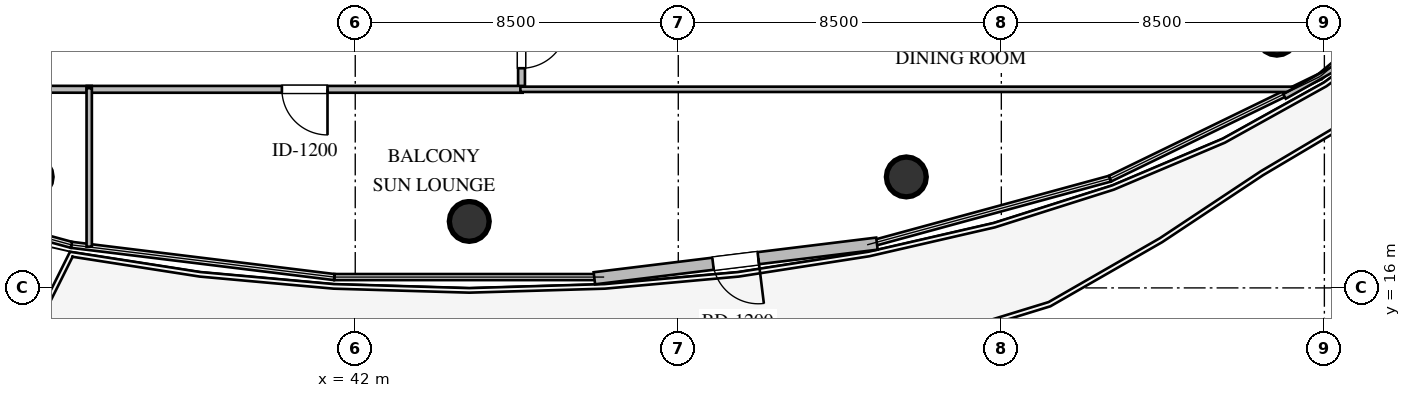
"""IFC4 building model, lengths in metres.
Left out: names, types, materials, properties, quantities, classifications, styles, units other than length and angle.
Written with IfcOpenShell. Run it as: python <this file> out.ifc"""

import sys

from ifc_helpers import new_model, si_unit, direction, frame, frame_2d, origin, origin_2d, place, context, subcontext, project, spatial, rectangle, circle, extrude, element, fill, save


model = new_model("IFC4")
c1 = context("Model", 3, precision=1e-05, world=origin(), true_north=direction((0.0, 1.0)))
c2 = subcontext(c1, "Body", "Model", "MODEL_VIEW")
j1 = project(units=[si_unit("LENGTHUNIT", "METRE"), si_unit("PLANEANGLEUNIT", "RADIAN")], contexts=[c1])
p1 = place(None, origin())
s1 = spatial("IfcSite", under=j1, at=p1, CompositionType="ELEMENT")
p2 = place(p1, origin())
s2 = spatial("IfcBuilding", under=s1, at=p2, CompositionType="ELEMENT")
p3 = place(p2, frame((0.0, 0.0, 213.6)))
s3 = spatial("IfcBuildingStorey", under=s2, at=p3, CompositionType="ELEMENT", Elevation=213.6)
for number, where, z_axis, x_axis in (
    (1, (45.0, 17.75, 0.0), (0.0, 0.0, 1.0), (1.0, 0.0, 0.0)),
    (2, (56.5, 18.92, 0.0), (0.0, 0.0, 1.0), (1.0, 0.0, 0.0)),
    (3, (66.25, 22.65, 0.0), (0.0, 0.0, 1.0), (1.0, 0.0, 0.0)),
):
    element("IfcColumn", number, at=place(p3, frame(where, z_axis=z_axis, x_axis=x_axis)), inside=s3, PredefinedType="COLUMN", context=c2, shape_type="SweptSolid", body=[
        extrude(circle(Radius=0.525, at=origin_2d()), origin(), (0.0, 0.0, 1.0), 3.6),
    ])
p4 = place(p3, frame((55.727, 17.165, 0.0), z_axis=(0.0, 0.0, 1.0), x_axis=(-0.992559081031, -0.121763995755, 0.0)))
e4 = element("IfcWall", 4, at=p4, inside=s3, PredefinedType="STANDARD", context=c2, shape_type="SweptSolid", body=[
    extrude(rectangle(XDim=7.491, YDim=0.32, at=frame_2d((3.745, 0.0))), origin(), (0.0, 0.0, 1.0), 3.36),
])
p5 = place(p4, frame((3.145, 0.0, 0.0)))
e5 = element("IfcOpeningElement", 5, at=p5, cuts=e4, PredefinedType="OPENING", context=c2, shape_type="SweptSolid", body=[
    extrude(rectangle(XDim=1.2, YDim=2.15, at=frame_2d((0.6, 1.075))), frame((0.0, 0.17, 0.0), z_axis=(0.0, -1.0, 0.0), x_axis=(1.0, 0.0, 0.0)), (0.0, 0.0, 1.0), 0.34),
])
p6 = place(p3, frame((46.375, 23.565, 0.0), z_axis=(0.0, 0.0, 1.0), x_axis=(0.0, -1.0, 0.0)))
e6 = element("IfcWall", 6, at=p6, inside=s3, PredefinedType="PARTITIONING", context=c2, shape_type="SweptSolid", body=[
    extrude(rectangle(XDim=2.37, YDim=0.18, at=frame_2d((1.185, 0.0))), origin(), (0.0, 0.0, 1.0), 3.36),
])
p7 = place(p6, frame((0.585, 0.0, 0.0)))
e7 = element("IfcOpeningElement", 7, at=p7, cuts=e6, PredefinedType="OPENING", context=c2, shape_type="SweptSolid", body=[
    extrude(rectangle(XDim=1.2, YDim=2.15, at=frame_2d((0.6, 1.075))), frame((0.0, 0.1, 0.0), z_axis=(0.0, -1.0, 0.0), x_axis=(1.0, 0.0, 0.0)), (0.0, 0.0, 1.0), 0.2),
])
p8 = place(p3, frame((35.065, 21.225, 0.0), z_axis=(0.0, 0.0, 1.0), x_axis=(-0.999998948453, 0.001450204611, 0.0)))
e8 = element("IfcWall", 8, at=p8, inside=s3, PredefinedType="PARTITIONING", context=c2, shape_type="SweptSolid", body=[
    extrude(rectangle(XDim=11.784, YDim=0.18, at=frame_2d((5.892, 0.0))), origin(), (0.0, 0.0, 1.0), 2.806),
])
p9 = place(p8, frame((7.779, 0.0, 0.0)))
e9 = element("IfcOpeningElement", 9, at=p9, cuts=e8, PredefinedType="OPENING", context=c2, shape_type="SweptSolid", body=[
    extrude(rectangle(XDim=1.1, YDim=2.1, at=frame_2d((0.55, 1.05))), frame((0.0, 0.1, 0.0), z_axis=(0.0, -1.0, 0.0), x_axis=(1.0, 0.0, 0.0)), (0.0, 0.0, 1.0), 0.2),
])
p10 = place(p3, frame((46.405, 21.225, 0.0), z_axis=(0.0, 0.0, 1.0), x_axis=(-1.0, 0.0, 0.0)))
e10 = element("IfcWall", 10, at=p10, inside=s3, PredefinedType="PARTITIONING", context=c2, shape_type="SweptSolid", body=[
    extrude(rectangle(XDim=11.47, YDim=0.18, at=frame_2d((5.735, 0.0))), origin(), (0.0, 0.0, 1.0), 2.996),
])
p11 = place(p10, frame((5.135, 0.0, 0.0)))
e11 = element("IfcOpeningElement", 11, at=p11, cuts=e10, PredefinedType="OPENING", context=c2, shape_type="SweptSolid", body=[
    extrude(rectangle(XDim=1.2, YDim=2.15, at=frame_2d((0.6, 1.075))), frame((0.0, 0.1, 0.0), z_axis=(0.0, -1.0, 0.0), x_axis=(1.0, 0.0, 0.0)), (0.0, 0.0, 1.0), 0.2),
])
p12 = place(p3, frame((66.684, 21.225, 0.0), z_axis=(0.0, 0.0, 1.0), x_axis=(-1.0, 0.0, 0.0)))
e12 = element("IfcWall", 12, at=p12, inside=s3, PredefinedType="PARTITIONING", context=c2, shape_type="SweptSolid", body=[
    extrude(rectangle(XDim=20.339, YDim=0.14, at=frame_2d((10.169, 0.0))), origin(), (0.0, 0.0, 1.0), 2.996),
])
p13 = place(p3, frame((67.748, 21.77, 0.0), z_axis=(0.0, 0.0, 1.0), x_axis=(-0.871352238731, -0.490658003153, 0.0)))
e13 = element("IfcWall", 13, at=p13, inside=s3, PredefinedType="PARTITIONING", context=c2, shape_type="SweptSolid", body=[
    extrude(rectangle(XDim=1.49, YDim=0.14, at=frame_2d((0.745, 0.0))), origin(), (0.0, 0.0, 1.0), 3.36),
])
p14 = place(p3, frame((35.0, 21.255, 0.0), z_axis=(0.0, 0.0, 1.0), x_axis=(0.0, -1.0, 0.0)))
e14 = element("IfcWall", 14, at=p14, inside=s3, PredefinedType="PARTITIONING", context=c2, shape_type="SweptSolid", body=[
    extrude(rectangle(XDim=4.169, YDim=0.14, at=frame_2d((2.085, 0.0))), origin(), (0.0, 0.0, 1.0), 3.36),
])
p15 = place(p5, origin())
e15 = element("IfcDoor", 15, at=p15, inside=s3, OperationType="SINGLE_SWING_LEFT", PredefinedType="DOOR", context=c2, shape_type="SweptSolid", body=[
    extrude(rectangle(XDim=1.2, YDim=2.15, at=frame_2d((0.6, 1.075))), frame((0.0, 0.025, 0.0), z_axis=(0.0, -1.0, 0.0), x_axis=(1.0, 0.0, 0.0)), (0.0, 0.0, 1.0), 0.05),
])
fill(e5, e15)
p16 = place(p7, origin())
e16 = element("IfcDoor", 16, at=p16, inside=s3, OperationType="SINGLE_SWING_LEFT", PredefinedType="DOOR", context=c2, shape_type="SweptSolid", body=[
    extrude(rectangle(XDim=1.2, YDim=2.15, at=frame_2d((0.6, 1.075))), frame((0.0, 0.025, 0.0), z_axis=(0.0, -1.0, 0.0), x_axis=(1.0, 0.0, 0.0)), (0.0, 0.0, 1.0), 0.05),
])
fill(e7, e16)
p17 = place(p11, origin())
e17 = element("IfcDoor", 17, at=p17, inside=s3, OperationType="SINGLE_SWING_LEFT", PredefinedType="DOOR", context=c2, shape_type="SweptSolid", body=[
    extrude(rectangle(XDim=1.2, YDim=2.15, at=frame_2d((0.6, 1.075))), frame((0.0, 0.025, 0.0), z_axis=(0.0, -1.0, 0.0), x_axis=(1.0, 0.0, 0.0)), (0.0, 0.0, 1.0), 0.05),
])
fill(e11, e17)
save(model, sys.argv[1])
